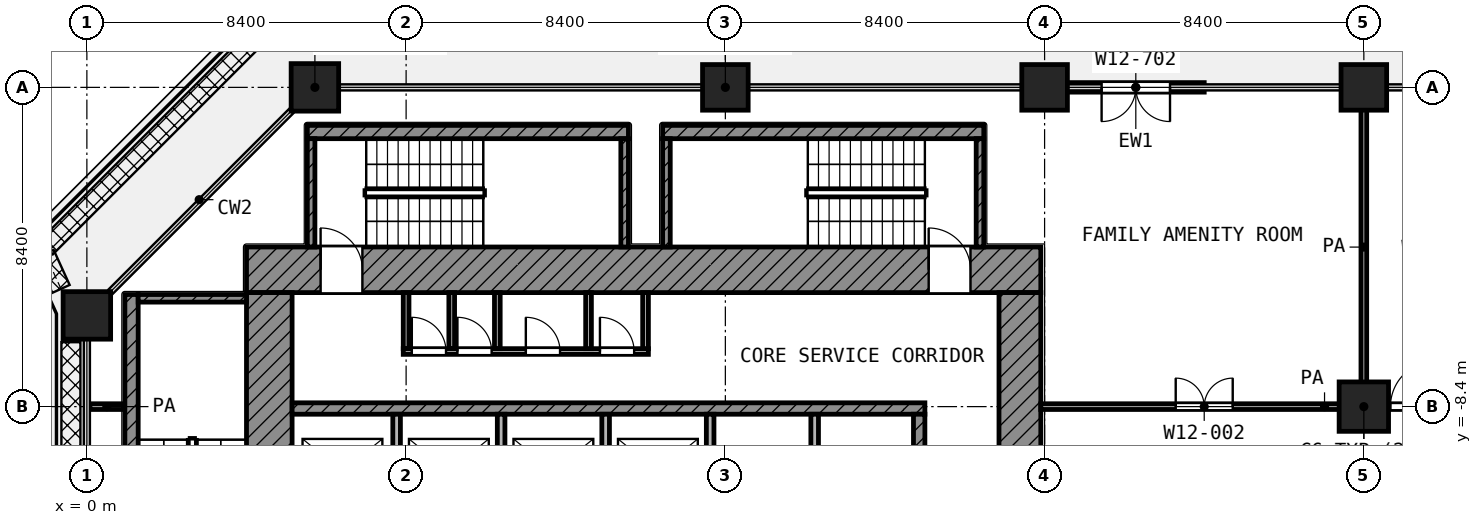
"""IFC4 building model, lengths in metres.
Left out: names, types, materials, properties, quantities, classifications, styles, units other than length and angle.
Written with IfcOpenShell. Run it as: python <this file> out.ifc"""

import sys

from ifc_helpers import new_model, si_unit, direction, frame, frame_2d, origin, origin_2d, place, context, subcontext, project, spatial, rectangle, extrude, element, fill, save


model = new_model("IFC4")
c1 = context("Model", 3, precision=1e-05, world=origin(), true_north=direction((0.0, 1.0)))
c2 = subcontext(c1, "Body", "Model", "MODEL_VIEW")
j1 = project(units=[si_unit("LENGTHUNIT", "METRE"), si_unit("PLANEANGLEUNIT", "RADIAN")], contexts=[c1])
p1 = place(None, origin())
s1 = spatial("IfcSite", under=j1, at=p1, CompositionType="ELEMENT")
p2 = place(p1, origin())
s2 = spatial("IfcBuilding", under=s1, at=p2, CompositionType="ELEMENT")
p3 = place(p2, frame((0.0, 0.0, 56.0)))
s3 = spatial("IfcBuildingStorey", under=s2, at=p3, CompositionType="ELEMENT", Elevation=56.0)
p4 = place(p3, frame((6.0, 0.0, 0.0), z_axis=(0.0, 0.0, 1.0), x_axis=(1.0, 0.0, 0.0)))
e1 = element("IfcColumn", 1, at=p4, inside=s3, PredefinedType="COLUMN", context=c2, shape_type="SweptSolid", body=[
    extrude(rectangle(XDim=1.25, YDim=1.25, at=origin_2d()), origin(), (0.0, 0.0, 1.0), 4.2),
])
for number, where, z_axis, x_axis in (
    (2, (16.8, 0.0, 0.0), (0.0, 0.0, 1.0), (1.0, 0.0, 0.0)),
    (3, (25.2, 0.0, 0.0), (0.0, 0.0, 1.0), (1.0, 0.0, 0.0)),
    (4, (33.6, 0.0, 0.0), (0.0, 0.0, 1.0), (1.0, 0.0, 0.0)),
):
    element("IfcColumn", number, at=place(p3, frame(where, z_axis=z_axis, x_axis=x_axis)), inside=s3, PredefinedType="COLUMN", context=c2, shape_type="SweptSolid", body=[
        extrude(rectangle(XDim=1.2, YDim=1.2, at=origin_2d()), origin(), (0.0, 0.0, 1.0), 4.2),
    ])
p5 = place(p3, frame((0.0, -6.0, 0.0), z_axis=(0.0, 0.0, 1.0), x_axis=(1.0, 0.0, 0.0)))
e5 = element("IfcColumn", 5, at=p5, inside=s3, PredefinedType="COLUMN", context=c2, shape_type="SweptSolid", body=[
    extrude(rectangle(XDim=1.25, YDim=1.25, at=origin_2d()), origin(), (0.0, 0.0, 1.0), 4.2),
])
p6 = place(p3, frame((33.6, -8.4, 0.0), z_axis=(0.0, 0.0, 1.0), x_axis=(1.0, 0.0, 0.0)))
e6 = element("IfcColumn", 6, at=p6, inside=s3, PredefinedType="COLUMN", context=c2, shape_type="SweptSolid", body=[
    extrude(rectangle(XDim=1.3, YDim=1.3, at=origin_2d()), origin(), (0.0, 0.0, 1.0), 4.2),
])
p7 = place(p3, frame((29.4, 0.0, 0.0), z_axis=(0.0, 0.0, 1.0), x_axis=(-1.0, 0.0, 0.0)))
e7 = element("IfcWall", 7, at=p7, inside=s3, PredefinedType="SOLIDWALL", context=c2, shape_type="SweptSolid", body=[
    extrude(rectangle(XDim=3.6, YDim=0.25, at=frame_2d((1.8, 0.0))), origin(), (0.0, 0.0, 1.0), 3.78),
])
p8 = place(p7, frame((0.9, 0.0, 0.0)))
e8 = element("IfcOpeningElement", 8, at=p8, cuts=e7, PredefinedType="OPENING", context=c2, shape_type="SweptSolid", body=[
    extrude(rectangle(XDim=1.8, YDim=2.1, at=frame_2d((0.9, 1.05))), frame((0.0, 0.135, 0.0), z_axis=(0.0, -1.0, 0.0), x_axis=(1.0, 0.0, 0.0)), (0.0, 0.0, 1.0), 0.27),
])
p9 = place(p3, frame((4.2, -4.8, 0.0), z_axis=(0.0, 0.0, 1.0), x_axis=(1.0, 0.0, 0.0)))
e9 = element("IfcWall", 9, at=p9, inside=s3, PredefinedType="SHEAR", context=c2, shape_type="SweptSolid", body=[
    extrude(rectangle(XDim=20.9, YDim=1.2, at=frame_2d((10.45, 0.0))), origin(), (0.0, 0.0, 1.0), 3.9),
])
p10 = place(p9, frame((1.95, 0.0, 0.0)))
e10 = element("IfcOpeningElement", 10, at=p10, cuts=e9, PredefinedType="OPENING", context=c2, shape_type="SweptSolid", body=[
    extrude(rectangle(XDim=1.1, YDim=2.1, at=frame_2d((0.55, 1.05))), frame((0.0, 0.61, 0.0), z_axis=(0.0, -1.0, 0.0), x_axis=(1.0, 0.0, 0.0)), (0.0, 0.0, 1.0), 1.22),
])
p11 = place(p9, frame((17.95, 0.0, 0.0)))
e11 = element("IfcOpeningElement", 11, at=p11, cuts=e9, PredefinedType="OPENING", context=c2, shape_type="SweptSolid", body=[
    extrude(rectangle(XDim=1.1, YDim=2.1, at=frame_2d((0.55, 1.05))), frame((0.0, 0.61, 0.0), z_axis=(0.0, -1.0, 0.0), x_axis=(1.0, 0.0, 0.0)), (0.0, 0.0, 1.0), 1.22),
])
p12 = place(p3, frame((4.8, -25.1, 0.0), z_axis=(0.0, 0.0, 1.0), x_axis=(0.0, 1.0, 0.0)))
e12 = element("IfcWall", 12, at=p12, inside=s3, PredefinedType="SHEAR", context=c2, shape_type="SweptSolid", body=[
    extrude(rectangle(XDim=19.7, YDim=1.2, at=frame_2d((9.85, 0.0))), origin(), (0.0, 0.0, 1.0), 3.9),
])
p13 = place(p12, frame((11.55, 0.0, 0.0)))
e13 = element("IfcOpeningElement", 13, at=p13, cuts=e12, PredefinedType="OPENING", context=c2, shape_type="SweptSolid", body=[
    extrude(rectangle(XDim=1.1, YDim=2.1, at=frame_2d((0.55, 1.05))), frame((0.0, 0.61, 0.0), z_axis=(0.0, -1.0, 0.0), x_axis=(1.0, 0.0, 0.0)), (0.0, 0.0, 1.0), 1.22),
])
p14 = place(p12, frame((2.25, 0.0, 0.0)))
e14 = element("IfcOpeningElement", 14, at=p14, cuts=e12, PredefinedType="OPENING", context=c2, shape_type="SweptSolid", body=[
    extrude(rectangle(XDim=1.1, YDim=2.1, at=frame_2d((0.55, 1.05))), frame((0.0, 0.61, 0.0), z_axis=(0.0, -1.0, 0.0), x_axis=(1.0, 0.0, 0.0)), (0.0, 0.0, 1.0), 1.22),
])
p15 = place(p3, frame((24.55, -24.0, 0.0), z_axis=(0.0, 0.0, 1.0), x_axis=(0.0, 1.0, 0.0)))
e15 = element("IfcWall", 15, at=p15, inside=s3, PredefinedType="SHEAR", context=c2, shape_type="SweptSolid", body=[
    extrude(rectangle(XDim=18.6, YDim=1.1, at=frame_2d((9.3, 0.0))), origin(), (0.0, 0.0, 1.0), 3.9),
])
p16 = place(p15, frame((10.5, 0.0, 0.0)))
e16 = element("IfcOpeningElement", 16, at=p16, cuts=e15, PredefinedType="OPENING", context=c2, shape_type="SweptSolid", body=[
    extrude(rectangle(XDim=1.8, YDim=2.1, at=frame_2d((0.9, 1.05))), frame((0.0, 0.56, 0.0), z_axis=(0.0, -1.0, 0.0), x_axis=(1.0, 0.0, 0.0)), (0.0, 0.0, 1.0), 1.12),
])
p17 = place(p3, frame((5.4, -8.45, 0.0), z_axis=(0.0, 0.0, 1.0), x_axis=(1.0, 0.0, 0.0)))
e17 = element("IfcWall", 17, at=p17, inside=s3, PredefinedType="SHEAR", context=c2, shape_type="SweptSolid", body=[
    extrude(rectangle(XDim=16.65, YDim=0.3, at=frame_2d((8.325, 0.0))), origin(), (0.0, 0.0, 1.0), 3.9),
])
p18 = place(p3, frame((21.9, -10.95, 0.0), z_axis=(0.0, 0.0, 1.0), x_axis=(0.0, 1.0, 0.0)))
e18 = element("IfcWall", 18, at=p18, inside=s3, PredefinedType="SHEAR", context=c2, shape_type="SweptSolid", body=[
    extrude(rectangle(XDim=2.35, YDim=0.3, at=frame_2d((1.175, 0.0))), origin(), (0.0, 0.0, 1.0), 3.9),
])
for number, where, z_axis, x_axis in (
    (19, (8.15, -10.95, 0.0), (0.0, 0.0, 1.0), (0.0, 1.0, 0.0)),
    (20, (10.9, -10.95, 0.0), (0.0, 0.0, 1.0), (0.0, 1.0, 0.0)),
    (21, (13.65, -10.95, 0.0), (0.0, 0.0, 1.0), (0.0, 1.0, 0.0)),
    (22, (16.4, -10.95, 0.0), (0.0, 0.0, 1.0), (0.0, 1.0, 0.0)),
    (23, (19.15, -10.95, 0.0), (0.0, 0.0, 1.0), (0.0, 1.0, 0.0)),
):
    element("IfcWall", number, at=place(p3, frame(where, z_axis=z_axis, x_axis=x_axis)), inside=s3, PredefinedType="PARTITIONING", context=c2, shape_type="SweptSolid", body=[
        extrude(rectangle(XDim=2.35, YDim=0.2, at=frame_2d((1.175, 0.0))), origin(), (0.0, 0.0, 1.0), 3.9),
    ])
p19 = place(p3, frame((8.325, -6.95, 0.0), z_axis=(0.0, 0.0, 1.0), x_axis=(1.0, 0.0, 0.0)))
e24 = element("IfcWall", 24, at=p19, inside=s3, PredefinedType="PARTITIONING", context=c2, shape_type="SweptSolid", body=[
    extrude(rectangle(XDim=6.45, YDim=0.15, at=frame_2d((3.225, 0.0))), origin(), (0.0, 0.0, 1.0), 3.9),
])
p20 = place(p19, frame((0.225, 0.0, 0.0)))
e25 = element("IfcOpeningElement", 25, at=p20, cuts=e24, PredefinedType="OPENING", context=c2, shape_type="SweptSolid", body=[
    extrude(rectangle(XDim=0.9, YDim=2.1, at=frame_2d((0.45, 1.05))), frame((0.0, 0.085, 0.0), z_axis=(0.0, -1.0, 0.0), x_axis=(1.0, 0.0, 0.0)), (0.0, 0.0, 1.0), 0.17),
])
p21 = place(p19, frame((1.425, 0.0, 0.0)))
e26 = element("IfcOpeningElement", 26, at=p21, cuts=e24, PredefinedType="OPENING", context=c2, shape_type="SweptSolid", body=[
    extrude(rectangle(XDim=0.9, YDim=2.1, at=frame_2d((0.45, 1.05))), frame((0.0, 0.085, 0.0), z_axis=(0.0, -1.0, 0.0), x_axis=(1.0, 0.0, 0.0)), (0.0, 0.0, 1.0), 0.17),
])
p22 = place(p19, frame((3.225, 0.0, 0.0)))
e27 = element("IfcOpeningElement", 27, at=p22, cuts=e24, PredefinedType="OPENING", context=c2, shape_type="SweptSolid", body=[
    extrude(rectangle(XDim=0.9, YDim=2.1, at=frame_2d((0.45, 1.05))), frame((0.0, 0.085, 0.0), z_axis=(0.0, -1.0, 0.0), x_axis=(1.0, 0.0, 0.0)), (0.0, 0.0, 1.0), 0.17),
])
p23 = place(p19, frame((5.175, 0.0, 0.0)))
e28 = element("IfcOpeningElement", 28, at=p23, cuts=e24, PredefinedType="OPENING", context=c2, shape_type="SweptSolid", body=[
    extrude(rectangle(XDim=0.9, YDim=2.1, at=frame_2d((0.45, 1.05))), frame((0.0, 0.085, 0.0), z_axis=(0.0, -1.0, 0.0), x_axis=(1.0, 0.0, 0.0)), (0.0, 0.0, 1.0), 0.17),
])
for number, where, z_axis, x_axis in (
    (29, (8.4, -6.875, 0.0), (0.0, 0.0, 1.0), (0.0, 1.0, 0.0)),
    (30, (9.6, -6.875, 0.0), (0.0, 0.0, 1.0), (0.0, 1.0, 0.0)),
    (31, (10.8, -6.875, 0.0), (0.0, 0.0, 1.0), (0.0, 1.0, 0.0)),
    (32, (13.2, -6.875, 0.0), (0.0, 0.0, 1.0), (0.0, 1.0, 0.0)),
    (33, (14.7, -6.875, 0.0), (0.0, 0.0, 1.0), (0.0, 1.0, 0.0)),
):
    element("IfcWall", number, at=place(p3, frame(where, z_axis=z_axis, x_axis=x_axis)), inside=s3, PredefinedType="PARTITIONING", context=c2, shape_type="SweptSolid", body=[
        extrude(rectangle(XDim=1.475, YDim=0.15, at=frame_2d((0.738, 0.0))), origin(), (0.0, 0.0, 1.0), 3.9),
    ])
p24 = place(p3, frame((1.175, -13.9, 0.0), z_axis=(0.0, 0.0, 1.0), x_axis=(0.0, 1.0, 0.0)))
e34 = element("IfcWall", 34, at=p24, inside=s3, PredefinedType="SHEAR", context=c2, shape_type="SweptSolid", body=[
    extrude(rectangle(XDim=8.45, YDim=0.35, at=frame_2d((4.225, 0.0))), origin(), (0.0, 0.0, 1.0), 3.9),
])
p25 = place(p3, frame((1.35, -5.55, 0.0), z_axis=(0.0, 0.0, 1.0), x_axis=(1.0, 0.0, 0.0)))
e35 = element("IfcWall", 35, at=p25, inside=s3, PredefinedType="SHEAR", context=c2, shape_type="SweptSolid", body=[
    extrude(rectangle(XDim=2.85, YDim=0.2, at=frame_2d((1.425, 0.0))), origin(), (0.0, 0.0, 1.0), 3.9),
])
p26 = place(p3, frame((5.8, -1.175, 0.0), z_axis=(0.0, 0.0, 1.0), x_axis=(1.0, 0.0, 0.0)))
e36 = element("IfcWall", 36, at=p26, inside=s3, PredefinedType="SHEAR", context=c2, shape_type="SweptSolid", body=[
    extrude(rectangle(XDim=8.45, YDim=0.35, at=frame_2d((4.225, 0.0))), origin(), (0.0, 0.0, 1.0), 3.9),
])
for number, where, z_axis, x_axis in (
    (37, (5.9, -4.2, 0.0), (0.0, 0.0, 1.0), (0.0, 1.0, 0.0)),
    (38, (14.15, -4.2, 0.0), (0.0, 0.0, 1.0), (0.0, 1.0, 0.0)),
):
    element("IfcWall", number, at=place(p3, frame(where, z_axis=z_axis, x_axis=x_axis)), inside=s3, PredefinedType="SHEAR", context=c2, shape_type="SweptSolid", body=[
        extrude(rectangle(XDim=2.85, YDim=0.2, at=frame_2d((1.425, 0.0))), origin(), (0.0, 0.0, 1.0), 3.9),
    ])
p27 = place(p3, frame((15.15, -1.175, 0.0), z_axis=(0.0, 0.0, 1.0), x_axis=(1.0, 0.0, 0.0)))
e39 = element("IfcWall", 39, at=p27, inside=s3, PredefinedType="SHEAR", context=c2, shape_type="SweptSolid", body=[
    extrude(rectangle(XDim=8.45, YDim=0.35, at=frame_2d((4.225, 0.0))), origin(), (0.0, 0.0, 1.0), 3.9),
])
for number, where, z_axis, x_axis in (
    (40, (15.25, -4.2, 0.0), (0.0, 0.0, 1.0), (0.0, 1.0, 0.0)),
    (41, (23.5, -4.2, 0.0), (0.0, 0.0, 1.0), (0.0, 1.0, 0.0)),
):
    element("IfcWall", number, at=place(p3, frame(where, z_axis=z_axis, x_axis=x_axis)), inside=s3, PredefinedType="SHEAR", context=c2, shape_type="SweptSolid", body=[
        extrude(rectangle(XDim=2.85, YDim=0.2, at=frame_2d((1.425, 0.0))), origin(), (0.0, 0.0, 1.0), 3.9),
    ])
p28 = place(p3, frame((0.08, -8.4, 0.0), z_axis=(0.0, 0.0, 1.0), x_axis=(1.0, 0.0, 0.0)))
e42 = element("IfcWall", 42, at=p28, inside=s3, PredefinedType="PARTITIONING", context=c2, shape_type="SweptSolid", body=[
    extrude(rectangle(XDim=0.89, YDim=0.15, at=frame_2d((0.445, 0.0))), origin(), (0.0, 0.0, 1.0), 3.9),
])
p29 = place(p3, frame((25.1, -8.4, 0.0), z_axis=(0.0, 0.0, 1.0), x_axis=(1.0, 0.0, 0.0)))
e43 = element("IfcWall", 43, at=p29, inside=s3, PredefinedType="PARTITIONING", context=c2, shape_type="SweptSolid", body=[
    extrude(rectangle(XDim=14.932, YDim=0.15, at=frame_2d((7.466, 0.0))), origin(), (0.0, 0.0, 1.0), 3.9),
])
p30 = place(p29, frame((3.55, 0.0, 0.0)))
e44 = element("IfcOpeningElement", 44, at=p30, cuts=e43, PredefinedType="OPENING", context=c2, shape_type="SweptSolid", body=[
    extrude(rectangle(XDim=1.5, YDim=2.1, at=frame_2d((0.75, 1.05))), frame((0.0, 0.085, 0.0), z_axis=(0.0, -1.0, 0.0), x_axis=(1.0, 0.0, 0.0)), (0.0, 0.0, 1.0), 0.17),
])
p31 = place(p29, frame((9.2, 0.0, 0.0)))
e45 = element("IfcOpeningElement", 45, at=p31, cuts=e43, PredefinedType="OPENING", context=c2, shape_type="SweptSolid", body=[
    extrude(rectangle(XDim=1.2, YDim=2.1, at=frame_2d((0.6, 1.05))), frame((0.0, 0.085, 0.0), z_axis=(0.0, -1.0, 0.0), x_axis=(1.0, 0.0, 0.0)), (0.0, 0.0, 1.0), 0.17),
])
p32 = place(p3, frame((33.6, -8.325, 0.0), z_axis=(0.0, 0.0, 1.0), x_axis=(0.0, 1.0, 0.0)))
e46 = element("IfcWall", 46, at=p32, inside=s3, PredefinedType="PARTITIONING", context=c2, shape_type="SweptSolid", body=[
    extrude(rectangle(XDim=8.245, YDim=0.15, at=frame_2d((4.123, 0.0))), origin(), (0.0, 0.0, 1.0), 3.9),
])
p33 = place(p8, origin())
e47 = element("IfcDoor", 47, at=p33, inside=s3, OperationType="DOUBLE_DOOR_SINGLE_SWING", PredefinedType="DOOR", context=c2, shape_type="SweptSolid", body=[
    extrude(rectangle(XDim=1.8, YDim=2.1, at=frame_2d((0.9, 1.05))), frame((0.0, 0.025, 0.0), z_axis=(0.0, -1.0, 0.0), x_axis=(1.0, 0.0, 0.0)), (0.0, 0.0, 1.0), 0.05),
])
fill(e8, e47)
p34 = place(p10, origin())
e48 = element("IfcDoor", 48, at=p34, inside=s3, OperationType="SINGLE_SWING_LEFT", PredefinedType="DOOR", context=c2, shape_type="SweptSolid", body=[
    extrude(rectangle(XDim=1.1, YDim=2.1, at=frame_2d((0.55, 1.05))), frame((0.0, 0.025, 0.0), z_axis=(0.0, -1.0, 0.0), x_axis=(1.0, 0.0, 0.0)), (0.0, 0.0, 1.0), 0.05),
])
fill(e10, e48)
p35 = place(p11, origin())
e49 = element("IfcDoor", 49, at=p35, inside=s3, OperationType="SINGLE_SWING_LEFT", PredefinedType="DOOR", context=c2, shape_type="SweptSolid", body=[
    extrude(rectangle(XDim=1.1, YDim=2.1, at=frame_2d((0.55, 1.05))), frame((0.0, 0.025, 0.0), z_axis=(0.0, -1.0, 0.0), x_axis=(1.0, 0.0, 0.0)), (0.0, 0.0, 1.0), 0.05),
])
fill(e11, e49)
p36 = place(p20, origin())
e50 = element("IfcDoor", 50, at=p36, inside=s3, OperationType="SINGLE_SWING_LEFT", PredefinedType="DOOR", context=c2, shape_type="SweptSolid", body=[
    extrude(rectangle(XDim=0.9, YDim=2.1, at=frame_2d((0.45, 1.05))), frame((0.0, 0.025, 0.0), z_axis=(0.0, -1.0, 0.0), x_axis=(1.0, 0.0, 0.0)), (0.0, 0.0, 1.0), 0.05),
])
fill(e25, e50)
p37 = place(p21, origin())
e51 = element("IfcDoor", 51, at=p37, inside=s3, OperationType="SINGLE_SWING_LEFT", PredefinedType="DOOR", context=c2, shape_type="SweptSolid", body=[
    extrude(rectangle(XDim=0.9, YDim=2.1, at=frame_2d((0.45, 1.05))), frame((0.0, 0.025, 0.0), z_axis=(0.0, -1.0, 0.0), x_axis=(1.0, 0.0, 0.0)), (0.0, 0.0, 1.0), 0.05),
])
fill(e26, e51)
p38 = place(p22, origin())
e52 = element("IfcDoor", 52, at=p38, inside=s3, OperationType="SINGLE_SWING_LEFT", PredefinedType="DOOR", context=c2, shape_type="SweptSolid", body=[
    extrude(rectangle(XDim=0.9, YDim=2.1, at=frame_2d((0.45, 1.05))), frame((0.0, 0.025, 0.0), z_axis=(0.0, -1.0, 0.0), x_axis=(1.0, 0.0, 0.0)), (0.0, 0.0, 1.0), 0.05),
])
fill(e27, e52)
p39 = place(p23, origin())
e53 = element("IfcDoor", 53, at=p39, inside=s3, OperationType="SINGLE_SWING_LEFT", PredefinedType="DOOR", context=c2, shape_type="SweptSolid", body=[
    extrude(rectangle(XDim=0.9, YDim=2.1, at=frame_2d((0.45, 1.05))), frame((0.0, 0.025, 0.0), z_axis=(0.0, -1.0, 0.0), x_axis=(1.0, 0.0, 0.0)), (0.0, 0.0, 1.0), 0.05),
])
fill(e28, e53)
p40 = place(p30, origin())
e54 = element("IfcDoor", 54, at=p40, inside=s3, OperationType="DOUBLE_DOOR_SINGLE_SWING", PredefinedType="DOOR", context=c2, shape_type="SweptSolid", body=[
    extrude(rectangle(XDim=1.5, YDim=2.1, at=frame_2d((0.75, 1.05))), frame((0.0, 0.025, 0.0), z_axis=(0.0, -1.0, 0.0), x_axis=(1.0, 0.0, 0.0)), (0.0, 0.0, 1.0), 0.05),
])
fill(e44, e54)
p41 = place(p31, origin())
e55 = element("IfcDoor", 55, at=p41, inside=s3, OperationType="SINGLE_SWING_RIGHT", PredefinedType="DOOR", context=c2, shape_type="SweptSolid", body=[
    extrude(rectangle(XDim=1.2, YDim=2.1, at=frame_2d((0.6, 1.05))), frame((0.0, 0.025, 0.0), z_axis=(0.0, -1.0, 0.0), x_axis=(1.0, 0.0, 0.0)), (0.0, 0.0, 1.0), 0.05),
])
fill(e45, e55)
save(model, sys.argv[1])
